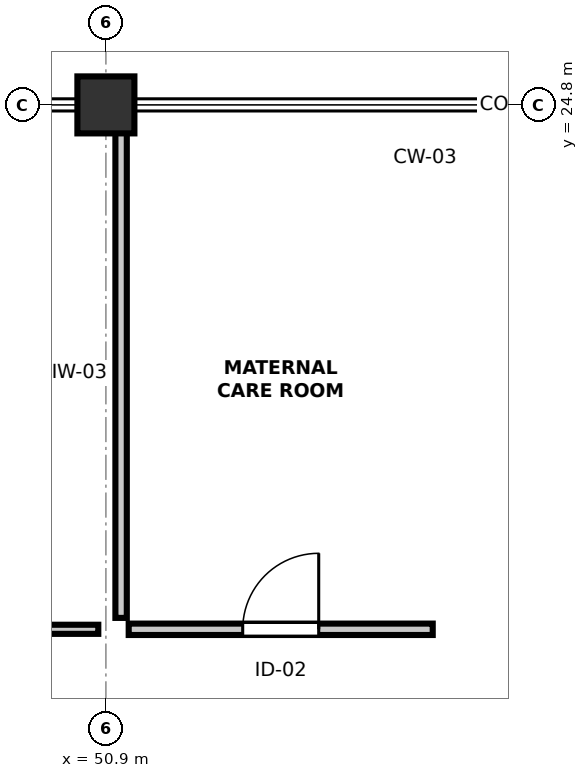
"""IFC4 building model, lengths in metres.
Left out: names, types, materials, properties, quantities, classifications, styles, units other than length and angle.
Written with IfcOpenShell. Run it as: python <this file> out.ifc"""

import sys

from ifc_helpers import new_model, si_unit, direction, frame, frame_2d, origin, origin_2d, place, context, subcontext, project, spatial, rectangle, extrude, element, fill, save


model = new_model("IFC4")
c1 = context("Model", 3, precision=1e-05, world=origin(), true_north=direction((0.0, 1.0)))
c2 = subcontext(c1, "Body", "Model", "MODEL_VIEW")
j1 = project(units=[si_unit("LENGTHUNIT", "METRE"), si_unit("PLANEANGLEUNIT", "RADIAN")], contexts=[c1])
p1 = place(None, origin())
s1 = spatial("IfcSite", under=j1, at=p1, CompositionType="ELEMENT")
p2 = place(p1, origin())
s2 = spatial("IfcBuilding", under=s1, at=p2, CompositionType="ELEMENT")
p3 = place(p2, origin())
s3 = spatial("IfcBuildingStorey", under=s2, at=p3, CompositionType="ELEMENT", Elevation=0.0)
p4 = place(p3, frame((50.9, 24.8, 0.0), z_axis=(0.0, 0.0, 1.0), x_axis=(1.0, 0.0, 0.0)))
e1 = element("IfcColumn", 1, at=p4, inside=s3, PredefinedType="COLUMN", context=c2, shape_type="SweptSolid", body=[
    extrude(rectangle(XDim=0.75, YDim=0.75, at=origin_2d()), origin(), (0.0, 0.0, 1.0), 4.8),
])
p5 = place(p3, frame((48.4, 17.9, 0.0), z_axis=(0.0, 0.0, 1.0), x_axis=(1.0, 0.0, 0.0)))
e2 = element("IfcWall", 2, at=p5, inside=s3, PredefinedType="PARTITIONING", context=c2, shape_type="SweptSolid", body=[
    extrude(rectangle(XDim=2.4, YDim=0.12, at=frame_2d((1.2, 0.0))), origin(), (0.0, 0.0, 1.0), 3.785),
])
p6 = place(p5, frame((0.625, 0.0, 0.0)))
e3 = element("IfcOpeningElement", 3, at=p6, cuts=e2, PredefinedType="OPENING", context=c2, shape_type="SweptSolid", body=[
    extrude(rectangle(XDim=0.95, YDim=2.12, at=frame_2d((0.475, 1.06))), frame((0.0, 0.07, 0.0), z_axis=(0.0, -1.0, 0.0), x_axis=(1.0, 0.0, 0.0)), (0.0, 0.0, 1.0), 0.14),
])
p7 = place(p3, frame((51.2, 17.9, 0.0), z_axis=(0.0, 0.0, 1.0), x_axis=(1.0, 0.0, 0.0)))
e4 = element("IfcWall", 4, at=p7, inside=s3, PredefinedType="PARTITIONING", context=c2, shape_type="SweptSolid", body=[
    extrude(rectangle(XDim=4.0, YDim=0.15, at=frame_2d((2.0, 0.0))), origin(), (0.0, 0.0, 1.0), 4.535),
])
p8 = place(p7, frame((1.5, 0.0, 0.0)))
e5 = element("IfcOpeningElement", 5, at=p8, cuts=e4, PredefinedType="OPENING", context=c2, shape_type="SweptSolid", body=[
    extrude(rectangle(XDim=1.0, YDim=2.14, at=frame_2d((0.5, 1.07))), frame((0.0, 0.085, 0.0), z_axis=(0.0, -1.0, 0.0), x_axis=(1.0, 0.0, 0.0)), (0.0, 0.0, 1.0), 0.17),
])
p9 = place(p3, frame((51.1, 18.05, 0.0), z_axis=(0.0, 0.0, 1.0), x_axis=(0.0, 1.0, 0.0)))
e6 = element("IfcWall", 6, at=p9, inside=s3, PredefinedType="PARTITIONING", context=c2, shape_type="SweptSolid", body=[
    extrude(rectangle(XDim=6.45, YDim=0.15, at=frame_2d((3.225, 0.0))), origin(), (0.0, 0.0, 1.0), 3.785),
])
p10 = place(p8, origin())
e7 = element("IfcDoor", 7, at=p10, inside=s3, OperationType="SINGLE_SWING_RIGHT", PredefinedType="DOOR", context=c2, shape_type="SweptSolid", body=[
    extrude(rectangle(XDim=1.0, YDim=2.14, at=frame_2d((0.5, 1.07))), frame((0.0, 0.025, 0.0), z_axis=(0.0, -1.0, 0.0), x_axis=(1.0, 0.0, 0.0)), (0.0, 0.0, 1.0), 0.05),
])
fill(e5, e7)
save(model, sys.argv[1])
